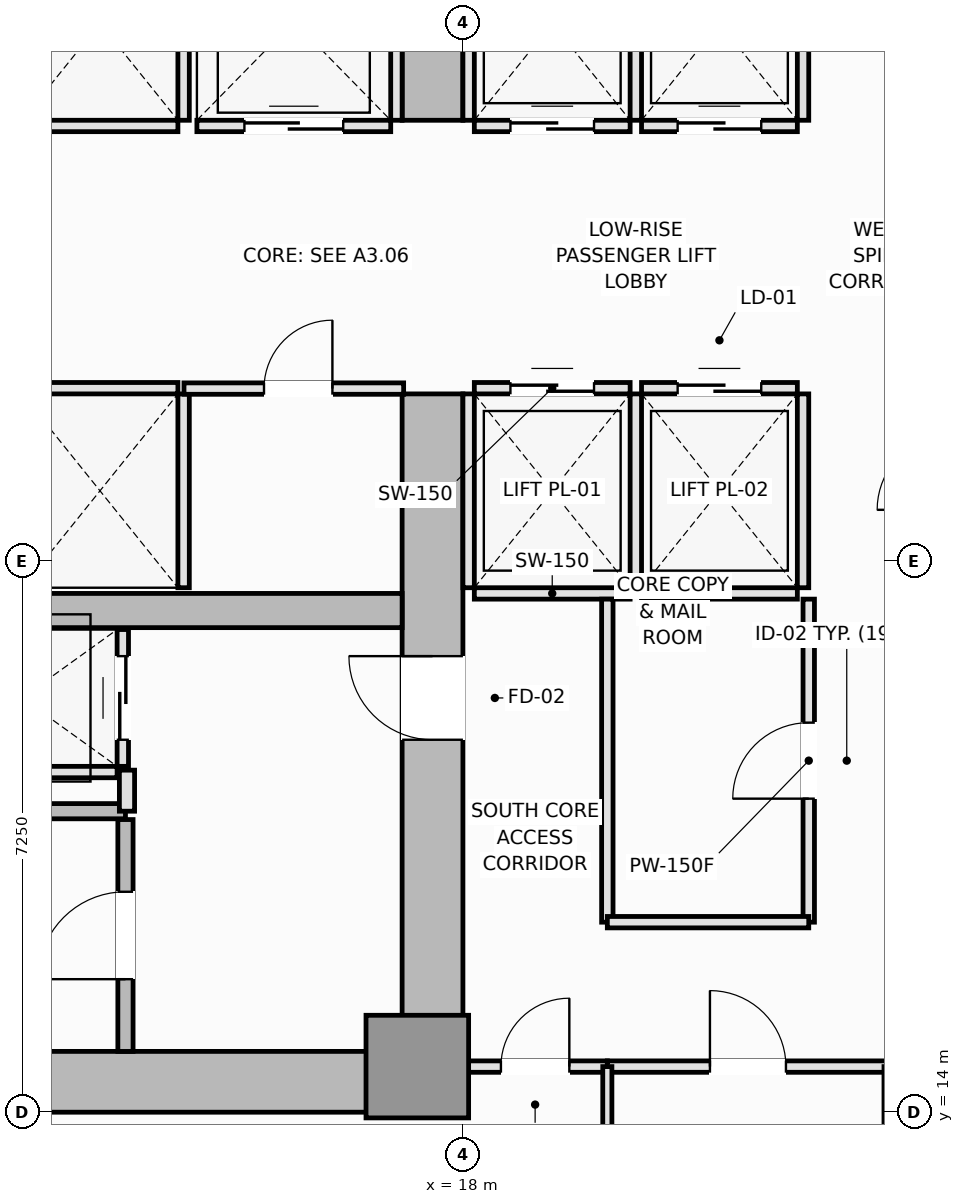
"""IFC4 building model, lengths in metres.
Left out: names, types, materials, properties, quantities, classifications, styles, units other than length and angle.
Written with IfcOpenShell. Run it as: python <this file> out.ifc"""

import sys

from ifc_helpers import new_model, si_unit, direction, frame, frame_2d, origin, origin_2d, place, context, subcontext, project, spatial, rectangle, extrude, element, fill, save


model = new_model("IFC4")
c1 = context("Model", 3, precision=1e-05, world=origin(), true_north=direction((0.0, 1.0)))
c2 = subcontext(c1, "Body", "Model", "MODEL_VIEW")
j1 = project(units=[si_unit("LENGTHUNIT", "METRE"), si_unit("PLANEANGLEUNIT", "RADIAN")], contexts=[c1])
p1 = place(None, origin())
s1 = spatial("IfcSite", under=j1, at=p1, CompositionType="ELEMENT")
p2 = place(p1, origin())
s2 = spatial("IfcBuilding", under=s1, at=p2, CompositionType="ELEMENT")
p3 = place(p2, frame((0.0, 0.0, 61.1)))
s3 = spatial("IfcBuildingStorey", under=s2, at=p3, CompositionType="ELEMENT", Elevation=61.1)
p4 = place(p3, frame((4.5, 14.4, 0.0), z_axis=(0.0, 0.0, 1.0), x_axis=(1.0, 0.0, 0.0)))
e1 = element("IfcWall", 1, at=p4, inside=s3, PredefinedType="SHEAR", context=c2, shape_type="SweptSolid", body=[
    extrude(rectangle(XDim=13.5, YDim=0.8, at=frame_2d((6.75, 0.0))), origin(), (0.0, 0.0, 1.0), 3.55),
])
p5 = place(p3, frame((17.6, 14.8, 0.0), z_axis=(0.0, 0.0, 1.0), x_axis=(0.0, 1.0, 0.0)))
e2 = element("IfcWall", 2, at=p5, inside=s3, PredefinedType="SHEAR", context=c2, shape_type="SweptSolid", body=[
    extrude(rectangle(XDim=8.65, YDim=0.8, at=frame_2d((4.325, 0.0))), origin(), (0.0, 0.0, 1.0), 3.55),
])
p6 = place(p5, frame((4.1, 0.0, 0.0)))
e3 = element("IfcOpeningElement", 3, at=p6, cuts=e2, PredefinedType="OPENING", context=c2, shape_type="SweptSolid", body=[
    extrude(rectangle(XDim=1.1, YDim=2.15, at=frame_2d((0.55, 1.075))), frame((0.0, 0.41, 0.0), z_axis=(0.0, -1.0, 0.0), x_axis=(1.0, 0.0, 0.0)), (0.0, 0.0, 1.0), 0.82),
])
p7 = place(p3, frame((17.6, 27.05, 0.0), z_axis=(0.0, 0.0, 1.0), x_axis=(0.0, 1.0, 0.0)))
e4 = element("IfcWall", 4, at=p7, inside=s3, PredefinedType="SHEAR", context=c2, shape_type="SweptSolid", body=[
    extrude(rectangle(XDim=8.65, YDim=0.8, at=frame_2d((4.325, 0.0))), origin(), (0.0, 0.0, 1.0), 3.55),
])
p8 = place(p7, frame((3.45, 0.0, 0.0)))
e5 = element("IfcOpeningElement", 5, at=p8, cuts=e4, PredefinedType="OPENING", context=c2, shape_type="SweptSolid", body=[
    extrude(rectangle(XDim=1.1, YDim=2.15, at=frame_2d((0.55, 1.075))), frame((0.0, 0.41, 0.0), z_axis=(0.0, -1.0, 0.0), x_axis=(1.0, 0.0, 0.0)), (0.0, 0.0, 1.0), 0.82),
])
p9 = place(p3, frame((5.3, 20.6, 0.0), z_axis=(0.0, 0.0, 1.0), x_axis=(1.0, 0.0, 0.0)))
e6 = element("IfcWall", 6, at=p9, inside=s3, PredefinedType="SHEAR", context=c2, shape_type="SweptSolid", body=[
    extrude(rectangle(XDim=11.9, YDim=0.45, at=frame_2d((5.95, 0.0))), origin(), (0.0, 0.0, 1.0), 3.55),
])
p10 = place(p3, frame((17.4, 14.6, 0.0), z_axis=(0.0, 0.0, 1.0), x_axis=(1.0, 0.0, 0.0)))
e7 = element("IfcColumn", 7, at=p10, inside=s3, PredefinedType="PILASTER", context=c2, shape_type="SweptSolid", body=[
    extrude(rectangle(XDim=1.35, YDim=1.35, at=origin_2d()), origin(), (0.0, 0.0, 1.0), 3.55),
])
p11 = place(p3, frame((5.9, 17.96, 0.0), z_axis=(0.0, 0.0, 1.0), x_axis=(1.0, 0.0, 0.0)))
e8 = element("IfcWall", 8, at=p11, inside=s3, PredefinedType="SOLIDWALL", context=c2, shape_type="SweptSolid", body=[
    extrude(rectangle(XDim=7.66, YDim=0.2, at=frame_2d((3.83, 0.0))), origin(), (0.0, 0.0, 1.0), 3.55),
])
p12 = place(p3, frame((13.56, 14.8, 0.0), z_axis=(0.0, 0.0, 1.0), x_axis=(0.0, 1.0, 0.0)))
e9 = element("IfcWall", 9, at=p12, inside=s3, PredefinedType="SOLIDWALL", context=c2, shape_type="SweptSolid", body=[
    extrude(rectangle(XDim=3.05, YDim=0.2, at=frame_2d((1.525, 0.0))), origin(), (0.0, 0.0, 1.0), 3.55),
])
p13 = place(p12, frame((0.95, 0.0, 0.0)))
e10 = element("IfcOpeningElement", 10, at=p13, cuts=e9, PredefinedType="OPENING", context=c2, shape_type="SweptSolid", body=[
    extrude(rectangle(XDim=1.15, YDim=2.15, at=frame_2d((0.575, 1.075))), frame((0.0, 0.11, 0.0), z_axis=(0.0, -1.0, 0.0), x_axis=(1.0, 0.0, 0.0)), (0.0, 0.0, 1.0), 0.22),
])
p14 = place(p3, frame((18.15, 20.825, 0.0), z_axis=(0.0, 0.0, 1.0), x_axis=(1.0, 0.0, 0.0)))
e11 = element("IfcWall", 11, at=p14, inside=s3, PredefinedType="PARTITIONING", context=c2, shape_type="SweptSolid", body=[
    extrude(rectangle(XDim=2.05, YDim=0.15, at=frame_2d((1.025, 0.0))), origin(), (0.0, 0.0, 1.0), 3.37),
])
p15 = place(p3, frame((18.15, 23.525, 0.0), z_axis=(0.0, 0.0, 1.0), x_axis=(1.0, 0.0, 0.0)))
e12 = element("IfcWall", 12, at=p15, inside=s3, PredefinedType="PARTITIONING", context=c2, shape_type="SweptSolid", body=[
    extrude(rectangle(XDim=2.05, YDim=0.15, at=frame_2d((1.025, 0.0))), origin(), (0.0, 0.0, 1.0), 3.37),
])
p16 = place(p15, frame((0.475, 0.0, 0.0)))
e13 = element("IfcOpeningElement", 13, at=p16, cuts=e12, PredefinedType="OPENING", context=c2, shape_type="SweptSolid", body=[
    extrude(rectangle(XDim=1.1, YDim=2.2, at=frame_2d((0.55, 1.1))), frame((0.0, 0.085, 0.0), z_axis=(0.0, -1.0, 0.0), x_axis=(1.0, 0.0, 0.0)), (0.0, 0.0, 1.0), 0.17),
])
for number, where, z_axis, x_axis in (
    (14, (18.075, 20.9, 0.0), (0.0, 0.0, 1.0), (0.0, 1.0, 0.0)),
    (15, (20.275, 20.9, 0.0), (0.0, 0.0, 1.0), (0.0, 1.0, 0.0)),
):
    element("IfcWall", number, at=place(p3, frame(where, z_axis=z_axis, x_axis=x_axis)), inside=s3, PredefinedType="PARTITIONING", context=c2, shape_type="SweptSolid", body=[
        extrude(rectangle(XDim=2.55, YDim=0.15, at=frame_2d((1.275, 0.0))), origin(), (0.0, 0.0, 1.0), 3.37),
    ])
p17 = place(p3, frame((20.35, 20.825, 0.0), z_axis=(0.0, 0.0, 1.0), x_axis=(1.0, 0.0, 0.0)))
e16 = element("IfcWall", 16, at=p17, inside=s3, PredefinedType="PARTITIONING", context=c2, shape_type="SweptSolid", body=[
    extrude(rectangle(XDim=2.05, YDim=0.15, at=frame_2d((1.025, 0.0))), origin(), (0.0, 0.0, 1.0), 3.37),
])
p18 = place(p3, frame((20.35, 23.525, 0.0), z_axis=(0.0, 0.0, 1.0), x_axis=(1.0, 0.0, 0.0)))
e17 = element("IfcWall", 17, at=p18, inside=s3, PredefinedType="PARTITIONING", context=c2, shape_type="SweptSolid", body=[
    extrude(rectangle(XDim=2.05, YDim=0.15, at=frame_2d((1.025, 0.0))), origin(), (0.0, 0.0, 1.0), 3.37),
])
p19 = place(p18, frame((0.475, 0.0, 0.0)))
e18 = element("IfcOpeningElement", 18, at=p19, cuts=e17, PredefinedType="OPENING", context=c2, shape_type="SweptSolid", body=[
    extrude(rectangle(XDim=1.1, YDim=2.2, at=frame_2d((0.55, 1.1))), frame((0.0, 0.085, 0.0), z_axis=(0.0, -1.0, 0.0), x_axis=(1.0, 0.0, 0.0)), (0.0, 0.0, 1.0), 0.17),
])
p20 = place(p3, frame((22.475, 20.9, 0.0), z_axis=(0.0, 0.0, 1.0), x_axis=(0.0, 1.0, 0.0)))
e19 = element("IfcWall", 19, at=p20, inside=s3, PredefinedType="PARTITIONING", context=c2, shape_type="SweptSolid", body=[
    extrude(rectangle(XDim=2.55, YDim=0.15, at=frame_2d((1.275, 0.0))), origin(), (0.0, 0.0, 1.0), 3.37),
])
p21 = place(p3, frame((18.15, 26.975, 0.0), z_axis=(0.0, 0.0, 1.0), x_axis=(1.0, 0.0, 0.0)))
e20 = element("IfcWall", 20, at=p21, inside=s3, PredefinedType="PARTITIONING", context=c2, shape_type="SweptSolid", body=[
    extrude(rectangle(XDim=2.05, YDim=0.15, at=frame_2d((1.025, 0.0))), origin(), (0.0, 0.0, 1.0), 3.37),
])
p22 = place(p21, frame((0.475, 0.0, 0.0)))
e21 = element("IfcOpeningElement", 21, at=p22, cuts=e20, PredefinedType="OPENING", context=c2, shape_type="SweptSolid", body=[
    extrude(rectangle(XDim=1.1, YDim=2.2, at=frame_2d((0.55, 1.1))), frame((0.0, 0.085, 0.0), z_axis=(0.0, -1.0, 0.0), x_axis=(1.0, 0.0, 0.0)), (0.0, 0.0, 1.0), 0.17),
])
for number, where, z_axis, x_axis in (
    (22, (18.075, 27.05, 0.0), (0.0, 0.0, 1.0), (0.0, 1.0, 0.0)),
    (23, (20.275, 27.05, 0.0), (0.0, 0.0, 1.0), (0.0, 1.0, 0.0)),
):
    element("IfcWall", number, at=place(p3, frame(where, z_axis=z_axis, x_axis=x_axis)), inside=s3, PredefinedType="PARTITIONING", context=c2, shape_type="SweptSolid", body=[
        extrude(rectangle(XDim=2.55, YDim=0.15, at=frame_2d((1.275, 0.0))), origin(), (0.0, 0.0, 1.0), 3.37),
    ])
p23 = place(p3, frame((20.35, 26.975, 0.0), z_axis=(0.0, 0.0, 1.0), x_axis=(1.0, 0.0, 0.0)))
e24 = element("IfcWall", 24, at=p23, inside=s3, PredefinedType="PARTITIONING", context=c2, shape_type="SweptSolid", body=[
    extrude(rectangle(XDim=2.05, YDim=0.15, at=frame_2d((1.025, 0.0))), origin(), (0.0, 0.0, 1.0), 3.37),
])
p24 = place(p23, frame((0.475, 0.0, 0.0)))
e25 = element("IfcOpeningElement", 25, at=p24, cuts=e24, PredefinedType="OPENING", context=c2, shape_type="SweptSolid", body=[
    extrude(rectangle(XDim=1.1, YDim=2.2, at=frame_2d((0.55, 1.1))), frame((0.0, 0.085, 0.0), z_axis=(0.0, -1.0, 0.0), x_axis=(1.0, 0.0, 0.0)), (0.0, 0.0, 1.0), 0.17),
])
p25 = place(p3, frame((22.475, 27.05, 0.0), z_axis=(0.0, 0.0, 1.0), x_axis=(0.0, 1.0, 0.0)))
e26 = element("IfcWall", 26, at=p25, inside=s3, PredefinedType="PARTITIONING", context=c2, shape_type="SweptSolid", body=[
    extrude(rectangle(XDim=2.55, YDim=0.15, at=frame_2d((1.275, 0.0))), origin(), (0.0, 0.0, 1.0), 3.37),
])
p26 = place(p3, frame((12.2, 23.525, 0.0), z_axis=(0.0, 0.0, 1.0), x_axis=(1.0, 0.0, 0.0)))
e27 = element("IfcWall", 27, at=p26, inside=s3, PredefinedType="PARTITIONING", context=c2, shape_type="SweptSolid", body=[
    extrude(rectangle(XDim=2.05, YDim=0.15, at=frame_2d((1.025, 0.0))), origin(), (0.0, 0.0, 1.0), 3.37),
])
p27 = place(p3, frame((14.325, 20.9, 0.0), z_axis=(0.0, 0.0, 1.0), x_axis=(0.0, 1.0, 0.0)))
e28 = element("IfcWall", 28, at=p27, inside=s3, PredefinedType="PARTITIONING", context=c2, shape_type="SweptSolid", body=[
    extrude(rectangle(XDim=2.55, YDim=0.15, at=frame_2d((1.275, 0.0))), origin(), (0.0, 0.0, 1.0), 3.37),
])
p28 = place(p3, frame((12.2, 26.975, 0.0), z_axis=(0.0, 0.0, 1.0), x_axis=(1.0, 0.0, 0.0)))
e29 = element("IfcWall", 29, at=p28, inside=s3, PredefinedType="PARTITIONING", context=c2, shape_type="SweptSolid", body=[
    extrude(rectangle(XDim=2.05, YDim=0.15, at=frame_2d((1.025, 0.0))), origin(), (0.0, 0.0, 1.0), 3.37),
])
p29 = place(p3, frame((14.325, 27.05, 0.0), z_axis=(0.0, 0.0, 1.0), x_axis=(0.0, 1.0, 0.0)))
e30 = element("IfcWall", 30, at=p29, inside=s3, PredefinedType="PARTITIONING", context=c2, shape_type="SweptSolid", body=[
    extrude(rectangle(XDim=2.55, YDim=0.15, at=frame_2d((1.275, 0.0))), origin(), (0.0, 0.0, 1.0), 3.37),
])
p30 = place(p3, frame((14.5, 26.975, 0.0), z_axis=(0.0, 0.0, 1.0), x_axis=(1.0, 0.0, 0.0)))
e31 = element("IfcWall", 31, at=p30, inside=s3, PredefinedType="PARTITIONING", context=c2, shape_type="SweptSolid", body=[
    extrude(rectangle(XDim=2.55, YDim=0.15, at=frame_2d((1.275, 0.0))), origin(), (0.0, 0.0, 1.0), 3.37),
])
p31 = place(p30, frame((0.625, 0.0, 0.0)))
e32 = element("IfcOpeningElement", 32, at=p31, cuts=e31, PredefinedType="OPENING", context=c2, shape_type="SweptSolid", body=[
    extrude(rectangle(XDim=1.3, YDim=2.2, at=frame_2d((0.65, 1.1))), frame((0.0, 0.085, 0.0), z_axis=(0.0, -1.0, 0.0), x_axis=(1.0, 0.0, 0.0)), (0.0, 0.0, 1.0), 0.17),
])
p32 = place(p3, frame((17.125, 27.05, 0.0), z_axis=(0.0, 0.0, 1.0), x_axis=(0.0, 1.0, 0.0)))
e33 = element("IfcWall", 33, at=p32, inside=s3, PredefinedType="PARTITIONING", context=c2, shape_type="SweptSolid", body=[
    extrude(rectangle(XDim=2.6, YDim=0.15, at=frame_2d((1.3, 0.0))), origin(), (0.0, 0.0, 1.0), 3.37),
])
p33 = place(p3, frame((10.95, 18.475, 0.0), z_axis=(0.0, 0.0, 1.0), x_axis=(1.0, 0.0, 0.0)))
e34 = element("IfcWall", 34, at=p33, inside=s3, PredefinedType="PARTITIONING", context=c2, shape_type="SweptSolid", body=[
    extrude(rectangle(XDim=2.5, YDim=0.15, at=frame_2d((1.25, 0.0))), origin(), (0.0, 0.0, 1.0), 3.37),
])
p34 = place(p3, frame((13.525, 18.55, 0.0), z_axis=(0.0, 0.0, 1.0), x_axis=(0.0, 1.0, 0.0)))
e35 = element("IfcWall", 35, at=p34, inside=s3, PredefinedType="PARTITIONING", context=c2, shape_type="SweptSolid", body=[
    extrude(rectangle(XDim=1.8, YDim=0.15, at=frame_2d((0.9, 0.0))), origin(), (0.0, 0.0, 1.0), 3.37),
])
p35 = place(p34, frame((0.35, 0.0, 0.0)))
e36 = element("IfcOpeningElement", 36, at=p35, cuts=e35, PredefinedType="OPENING", context=c2, shape_type="SweptSolid", body=[
    extrude(rectangle(XDim=1.1, YDim=2.2, at=frame_2d((0.55, 1.1))), frame((0.0, 0.085, 0.0), z_axis=(0.0, -1.0, 0.0), x_axis=(1.0, 0.0, 0.0)), (0.0, 0.0, 1.0), 0.17),
])
p36 = place(p3, frame((13.58, 17.96, 0.0), z_axis=(0.0, 0.0, 1.0), x_axis=(0.0, 1.0, 0.0)))
e37 = element("IfcWall", 37, at=p36, inside=s3, PredefinedType="PARTITIONING", context=c2, shape_type="SweptSolid", body=[
    extrude(rectangle(XDim=0.54, YDim=0.2, at=frame_2d((0.27, 0.0))), origin(), (0.0, 0.0, 1.0), 3.37),
])
p37 = place(p3, frame((14.33, 23.52, 0.0), z_axis=(0.0, 0.0, 1.0), x_axis=(1.0, 0.0, 0.0)))
e38 = element("IfcWall", 38, at=p37, inside=s3, PredefinedType="PARTITIONING", context=c2, shape_type="SweptSolid", body=[
    extrude(rectangle(XDim=2.89, YDim=0.15, at=frame_2d((1.445, 0.0))), origin(), (0.0, 0.0, 1.0), 3.37),
])
p38 = place(p37, frame((1.053, 0.0, 0.0)))
e39 = element("IfcOpeningElement", 39, at=p38, cuts=e38, PredefinedType="OPENING", context=c2, shape_type="SweptSolid", body=[
    extrude(rectangle(XDim=0.9, YDim=2.1, at=frame_2d((0.45, 1.05))), frame((0.0, 0.085, 0.0), z_axis=(0.0, -1.0, 0.0), x_axis=(1.0, 0.0, 0.0)), (0.0, 0.0, 1.0), 0.17),
])
p39 = place(p3, frame((22.55, 16.5, 0.0), z_axis=(0.0, 0.0, 1.0), x_axis=(0.0, 1.0, 0.0)))
e40 = element("IfcWall", 40, at=p39, inside=s3, PredefinedType="PARTITIONING", context=c2, shape_type="SweptSolid", body=[
    extrude(rectangle(XDim=4.25, YDim=0.15, at=frame_2d((2.125, 0.0))), origin(), (0.0, 0.0, 1.0), 3.01),
])
p40 = place(p39, frame((1.625, 0.0, 0.0)))
e41 = element("IfcOpeningElement", 41, at=p40, cuts=e40, PredefinedType="OPENING", context=c2, shape_type="SweptSolid", body=[
    extrude(rectangle(XDim=1.0, YDim=2.15, at=frame_2d((0.5, 1.075))), frame((0.0, 0.085, 0.0), z_axis=(0.0, -1.0, 0.0), x_axis=(1.0, 0.0, 0.0)), (0.0, 0.0, 1.0), 0.17),
])
p41 = place(p3, frame((19.9, 16.5, 0.0), z_axis=(0.0, 0.0, 1.0), x_axis=(0.0, 1.0, 0.0)))
e42 = element("IfcWall", 42, at=p41, inside=s3, PredefinedType="PARTITIONING", context=c2, shape_type="SweptSolid", body=[
    extrude(rectangle(XDim=4.25, YDim=0.15, at=frame_2d((2.125, 0.0))), origin(), (0.0, 0.0, 1.0), 3.37),
])
p42 = place(p3, frame((19.9, 16.5, 0.0), z_axis=(0.0, 0.0, 1.0), x_axis=(1.0, 0.0, 0.0)))
e43 = element("IfcWall", 43, at=p42, inside=s3, PredefinedType="PARTITIONING", context=c2, shape_type="SweptSolid", body=[
    extrude(rectangle(XDim=2.65, YDim=0.15, at=frame_2d((1.325, 0.0))), origin(), (0.0, 0.0, 1.0), 3.37),
])
p43 = place(p3, frame((18.0, 14.6, 0.0), z_axis=(0.0, 0.0, 1.0), x_axis=(1.0, 0.0, 0.0)))
e44 = element("IfcWall", 44, at=p43, inside=s3, PredefinedType="PARTITIONING", context=c2, shape_type="SweptSolid", body=[
    extrude(rectangle(XDim=1.9, YDim=0.15, at=frame_2d((0.95, 0.0))), origin(), (0.0, 0.0, 1.0), 3.37),
])
p44 = place(p43, frame((0.5, 0.0, 0.0)))
e45 = element("IfcOpeningElement", 45, at=p44, cuts=e44, PredefinedType="OPENING", context=c2, shape_type="SweptSolid", body=[
    extrude(rectangle(XDim=0.9, YDim=2.1, at=frame_2d((0.45, 1.05))), frame((0.0, 0.085, 0.0), z_axis=(0.0, -1.0, 0.0), x_axis=(1.0, 0.0, 0.0)), (0.0, 0.0, 1.0), 0.17),
])
p45 = place(p3, frame((19.9, 14.6, 0.0), z_axis=(0.0, 0.0, 1.0), x_axis=(1.0, 0.0, 0.0)))
e46 = element("IfcWall", 46, at=p45, inside=s3, PredefinedType="PARTITIONING", context=c2, shape_type="SweptSolid", body=[
    extrude(rectangle(XDim=3.7, YDim=0.15, at=frame_2d((1.85, 0.0))), origin(), (0.0, 0.0, 1.0), 3.37),
])
p46 = place(p45, frame((1.35, 0.0, 0.0)))
e47 = element("IfcOpeningElement", 47, at=p46, cuts=e46, PredefinedType="OPENING", context=c2, shape_type="SweptSolid", body=[
    extrude(rectangle(XDim=1.0, YDim=2.15, at=frame_2d((0.5, 1.075))), frame((0.0, 0.085, 0.0), z_axis=(0.0, -1.0, 0.0), x_axis=(1.0, 0.0, 0.0)), (0.0, 0.0, 1.0), 0.17),
])
for number, where, z_axis, x_axis in (
    (48, (19.9, 2.51, 0.0), (0.0, 0.0, 1.0), (0.0, 1.0, 0.0)),
    (49, (23.6, 2.51, 0.0), (0.0, 0.0, 1.0), (0.0, 1.0, 0.0)),
):
    element("IfcWall", number, at=place(p3, frame(where, z_axis=z_axis, x_axis=x_axis)), inside=s3, PredefinedType="PARTITIONING", context=c2, shape_type="SweptSolid", body=[
        extrude(rectangle(XDim=12.09, YDim=0.12, at=frame_2d((6.045, 0.0))), origin(), (0.0, 0.0, 1.0), 3.37),
    ])
p47 = place(p13, origin())
e50 = element("IfcDoor", 50, at=p47, inside=s3, OperationType="SINGLE_SWING_LEFT", PredefinedType="DOOR", context=c2, shape_type="SweptSolid", body=[
    extrude(rectangle(XDim=1.15, YDim=2.15, at=frame_2d((0.575, 1.075))), frame((0.0, 0.025, 0.0), z_axis=(0.0, -1.0, 0.0), x_axis=(1.0, 0.0, 0.0)), (0.0, 0.0, 1.0), 0.05),
])
fill(e10, e50)
p48 = place(p16, origin())
e51 = element("IfcDoor", 51, at=p48, inside=s3, OperationType="DOUBLE_DOOR_SLIDING", PredefinedType="DOOR", context=c2, shape_type="SweptSolid", body=[
    extrude(rectangle(XDim=1.1, YDim=2.2, at=frame_2d((0.55, 1.1))), frame((0.0, 0.025, 0.0), z_axis=(0.0, -1.0, 0.0), x_axis=(1.0, 0.0, 0.0)), (0.0, 0.0, 1.0), 0.05),
])
fill(e13, e51)
p49 = place(p19, origin())
e52 = element("IfcDoor", 52, at=p49, inside=s3, OperationType="DOUBLE_DOOR_SLIDING", PredefinedType="DOOR", context=c2, shape_type="SweptSolid", body=[
    extrude(rectangle(XDim=1.1, YDim=2.2, at=frame_2d((0.55, 1.1))), frame((0.0, 0.025, 0.0), z_axis=(0.0, -1.0, 0.0), x_axis=(1.0, 0.0, 0.0)), (0.0, 0.0, 1.0), 0.05),
])
fill(e18, e52)
p50 = place(p22, origin())
e53 = element("IfcDoor", 53, at=p50, inside=s3, OperationType="DOUBLE_DOOR_SLIDING", PredefinedType="DOOR", context=c2, shape_type="SweptSolid", body=[
    extrude(rectangle(XDim=1.1, YDim=2.2, at=frame_2d((0.55, 1.1))), frame((0.0, 0.025, 0.0), z_axis=(0.0, -1.0, 0.0), x_axis=(1.0, 0.0, 0.0)), (0.0, 0.0, 1.0), 0.05),
])
fill(e21, e53)
p51 = place(p24, origin())
e54 = element("IfcDoor", 54, at=p51, inside=s3, OperationType="DOUBLE_DOOR_SLIDING", PredefinedType="DOOR", context=c2, shape_type="SweptSolid", body=[
    extrude(rectangle(XDim=1.1, YDim=2.2, at=frame_2d((0.55, 1.1))), frame((0.0, 0.025, 0.0), z_axis=(0.0, -1.0, 0.0), x_axis=(1.0, 0.0, 0.0)), (0.0, 0.0, 1.0), 0.05),
])
fill(e25, e54)
p52 = place(p31, origin())
e55 = element("IfcDoor", 55, at=p52, inside=s3, OperationType="DOUBLE_DOOR_SLIDING", PredefinedType="DOOR", context=c2, shape_type="SweptSolid", body=[
    extrude(rectangle(XDim=1.3, YDim=2.2, at=frame_2d((0.65, 1.1))), frame((0.0, 0.025, 0.0), z_axis=(0.0, -1.0, 0.0), x_axis=(1.0, 0.0, 0.0)), (0.0, 0.0, 1.0), 0.05),
])
fill(e32, e55)
p53 = place(p35, origin())
e56 = element("IfcDoor", 56, at=p53, inside=s3, OperationType="DOUBLE_DOOR_SLIDING", PredefinedType="DOOR", context=c2, shape_type="SweptSolid", body=[
    extrude(rectangle(XDim=1.1, YDim=2.2, at=frame_2d((0.55, 1.1))), frame((0.0, 0.025, 0.0), z_axis=(0.0, -1.0, 0.0), x_axis=(1.0, 0.0, 0.0)), (0.0, 0.0, 1.0), 0.05),
])
fill(e36, e56)
p54 = place(p6, origin())
e57 = element("IfcDoor", 57, at=p54, inside=s3, OperationType="SINGLE_SWING_RIGHT", PredefinedType="DOOR", context=c2, shape_type="SweptSolid", body=[
    extrude(rectangle(XDim=1.1, YDim=2.15, at=frame_2d((0.55, 1.075))), frame((0.0, 0.025, 0.0), z_axis=(0.0, -1.0, 0.0), x_axis=(1.0, 0.0, 0.0)), (0.0, 0.0, 1.0), 0.05),
])
fill(e3, e57)
p55 = place(p38, origin())
e58 = element("IfcDoor", 58, at=p55, inside=s3, OperationType="SINGLE_SWING_RIGHT", PredefinedType="DOOR", context=c2, shape_type="SweptSolid", body=[
    extrude(rectangle(XDim=0.9, YDim=2.1, at=frame_2d((0.45, 1.05))), frame((0.0, 0.025, 0.0), z_axis=(0.0, -1.0, 0.0), x_axis=(1.0, 0.0, 0.0)), (0.0, 0.0, 1.0), 0.05),
])
fill(e39, e58)
p56 = place(p40, origin())
e59 = element("IfcDoor", 59, at=p56, inside=s3, OperationType="SINGLE_SWING_LEFT", PredefinedType="DOOR", context=c2, shape_type="SweptSolid", body=[
    extrude(rectangle(XDim=1.0, YDim=2.15, at=frame_2d((0.5, 1.075))), frame((0.0, 0.025, 0.0), z_axis=(0.0, -1.0, 0.0), x_axis=(1.0, 0.0, 0.0)), (0.0, 0.0, 1.0), 0.05),
])
fill(e41, e59)
p57 = place(p44, origin())
e60 = element("IfcDoor", 60, at=p57, inside=s3, OperationType="SINGLE_SWING_RIGHT", PredefinedType="DOOR", context=c2, shape_type="SweptSolid", body=[
    extrude(rectangle(XDim=0.9, YDim=2.1, at=frame_2d((0.45, 1.05))), frame((0.0, 0.025, 0.0), z_axis=(0.0, -1.0, 0.0), x_axis=(1.0, 0.0, 0.0)), (0.0, 0.0, 1.0), 0.05),
])
fill(e45, e60)
p58 = place(p46, origin())
e61 = element("IfcDoor", 61, at=p58, inside=s3, OperationType="SINGLE_SWING_LEFT", PredefinedType="DOOR", context=c2, shape_type="SweptSolid", body=[
    extrude(rectangle(XDim=1.0, YDim=2.15, at=frame_2d((0.5, 1.075))), frame((0.0, 0.025, 0.0), z_axis=(0.0, -1.0, 0.0), x_axis=(1.0, 0.0, 0.0)), (0.0, 0.0, 1.0), 0.05),
])
fill(e47, e61)
save(model, sys.argv[1])
